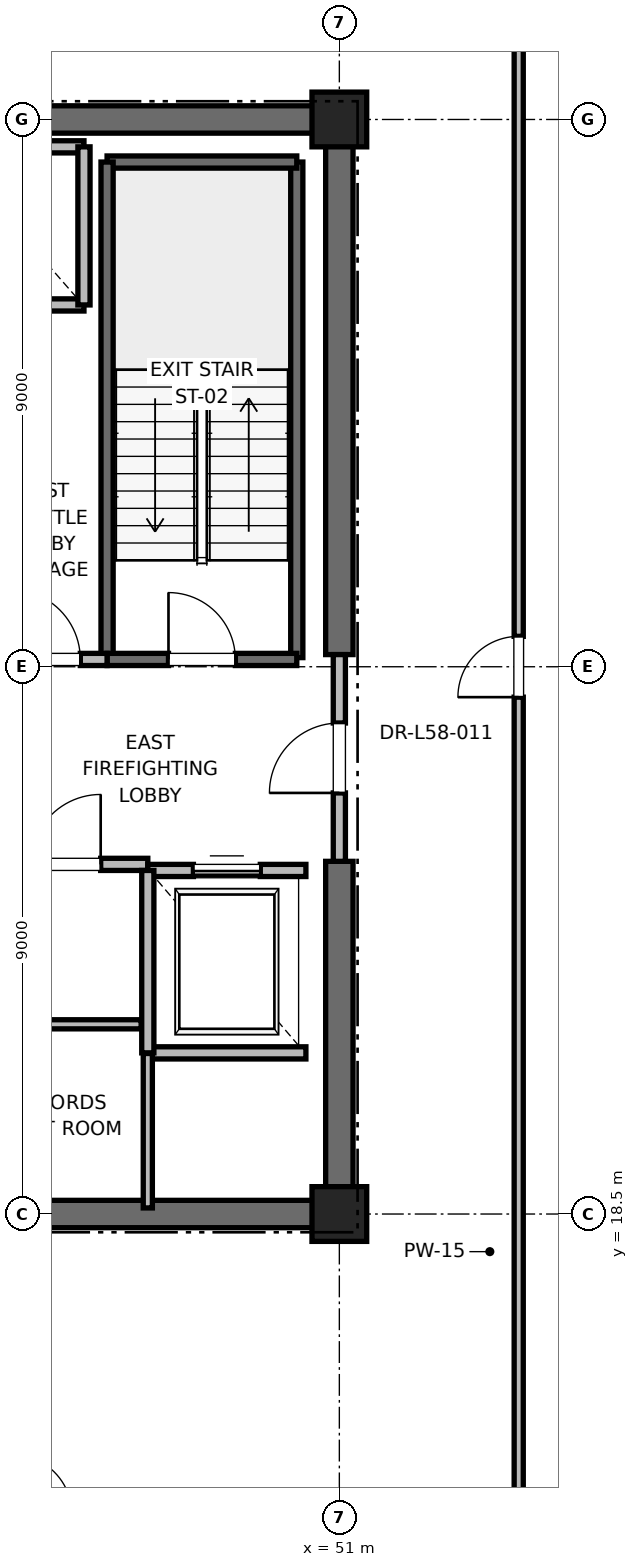
"""IFC4 building model, lengths in metres.
Left out: names, types, materials, properties, quantities, classifications, styles, units other than length and angle.
Written with IfcOpenShell. Run it as: python <this file> out.ifc"""

import sys

from ifc_helpers import new_model, si_unit, direction, frame, frame_2d, origin, origin_2d, place, context, subcontext, project, spatial, rectangle, extrude, element, fill, save


model = new_model("IFC4")
c1 = context("Model", 3, precision=1e-05, world=origin(), true_north=direction((0.0, 1.0)))
c2 = subcontext(c1, "Body", "Model", "MODEL_VIEW")
j1 = project(units=[si_unit("LENGTHUNIT", "METRE"), si_unit("PLANEANGLEUNIT", "RADIAN")], contexts=[c1])
p1 = place(None, origin())
s1 = spatial("IfcSite", under=j1, at=p1, CompositionType="ELEMENT")
p2 = place(p1, origin())
s2 = spatial("IfcBuilding", under=s1, at=p2, CompositionType="ELEMENT")
p3 = place(p2, frame((0.0, 0.0, 251.2)))
s3 = spatial("IfcBuildingStorey", under=s2, at=p3, CompositionType="ELEMENT", Elevation=251.2)
for number, where, z_axis, x_axis in (
    (1, (51.0, 18.5, 0.0), (0.0, 0.0, 1.0), (1.0, 0.0, 0.0)),
    (2, (51.0, 36.5, 0.0), (0.0, 0.0, 1.0), (1.0, 0.0, 0.0)),
):
    element("IfcColumn", number, at=place(p3, frame(where, z_axis=z_axis, x_axis=x_axis)), inside=s3, PredefinedType="PILASTER", context=c2, shape_type="SweptSolid", body=[
        extrude(rectangle(XDim=0.9, YDim=0.9, at=origin_2d()), origin(), (0.0, 0.0, 1.0), 4.0),
    ])
p4 = place(p3, frame((41.8, 18.5, 0.0), z_axis=(0.0, 0.0, 1.0), x_axis=(1.0, 0.0, 0.0)))
e3 = element("IfcWall", 3, at=p4, inside=s3, PredefinedType="SHEAR", context=c2, shape_type="SweptSolid", body=[
    extrude(rectangle(XDim=9.2, YDim=0.45, at=frame_2d((4.6, 0.0))), origin(), (0.0, 0.0, 1.0), 3.785),
])
for number, where, z_axis, x_axis in (
    (4, (45.2, 36.5, 0.0), (0.0, 0.0, 1.0), (1.0, 0.0, 0.0)),
    (5, (51.0, 18.5, 0.0), (0.0, 0.0, 1.0), (0.0, 1.0, 0.0)),
):
    element("IfcWall", number, at=place(p3, frame(where, z_axis=z_axis, x_axis=x_axis)), inside=s3, PredefinedType="SHEAR", context=c2, shape_type="SweptSolid", body=[
        extrude(rectangle(XDim=5.8, YDim=0.45, at=frame_2d((2.9, 0.0))), origin(), (0.0, 0.0, 1.0), 3.785),
    ])
p5 = place(p3, frame((51.0, 27.7, 0.0), z_axis=(0.0, 0.0, 1.0), x_axis=(0.0, 1.0, 0.0)))
e6 = element("IfcWall", 6, at=p5, inside=s3, PredefinedType="SHEAR", context=c2, shape_type="SweptSolid", body=[
    extrude(rectangle(XDim=8.8, YDim=0.45, at=frame_2d((4.4, 0.0))), origin(), (0.0, 0.0, 1.0), 3.785),
])
p6 = place(p3, frame((50.3, 27.65, 0.0), z_axis=(0.0, 0.0, 1.0), x_axis=(0.0, 1.0, 0.0)))
e7 = element("IfcWall", 7, at=p6, inside=s3, PredefinedType="SOLIDWALL", context=c2, shape_type="SweptSolid", body=[
    extrude(rectangle(XDim=8.15, YDim=0.2, at=frame_2d((4.075, 0.0))), origin(), (0.0, 0.0, 1.0), 3.785),
])
p7 = place(p3, frame((47.18, 35.8, 0.0), z_axis=(0.0, 0.0, 1.0), x_axis=(1.0, 0.0, 0.0)))
e8 = element("IfcWall", 8, at=p7, inside=s3, PredefinedType="SOLIDWALL", context=c2, shape_type="SweptSolid", body=[
    extrude(rectangle(XDim=3.12, YDim=0.2, at=frame_2d((1.56, 0.0))), origin(), (0.0, 0.0, 1.0), 3.785),
])
p8 = place(p3, frame((47.18, 27.62, 0.0), z_axis=(0.0, 0.0, 1.0), x_axis=(0.0, 1.0, 0.0)))
e9 = element("IfcWall", 9, at=p8, inside=s3, PredefinedType="SOLIDWALL", context=c2, shape_type="SweptSolid", body=[
    extrude(rectangle(XDim=8.18, YDim=0.2, at=frame_2d((4.09, 0.0))), origin(), (0.0, 0.0, 1.0), 3.785),
])
p9 = place(p3, frame((47.18, 27.62, 0.0), z_axis=(0.0, 0.0, 1.0), x_axis=(1.0, 0.0, 0.0)))
e10 = element("IfcWall", 10, at=p9, inside=s3, PredefinedType="SOLIDWALL", context=c2, shape_type="SweptSolid", body=[
    extrude(rectangle(XDim=3.12, YDim=0.2, at=frame_2d((1.56, 0.0))), origin(), (0.0, 0.0, 1.0), 3.785),
])
p10 = place(p9, frame((1.01, 0.0, 0.0)))
e11 = element("IfcOpeningElement", 11, at=p10, cuts=e10, PredefinedType="OPENING", context=c2, shape_type="SweptSolid", body=[
    extrude(rectangle(XDim=1.1, YDim=2.15, at=frame_2d((0.55, 1.075))), frame((0.0, 0.1, 0.0), z_axis=(0.0, -1.0, 0.0), x_axis=(1.0, 0.0, 0.0)), (0.0, 0.0, 1.0), 0.2),
])
p11 = place(p3, frame((45.15, 24.25, 0.0), z_axis=(0.0, 0.0, 1.0), x_axis=(1.0, 0.0, 0.0)))
e12 = element("IfcWall", 12, at=p11, inside=s3, PredefinedType="PARTITIONING", context=c2, shape_type="SweptSolid", body=[
    extrude(rectangle(XDim=2.7, YDim=0.2, at=frame_2d((1.35, 0.0))), origin(), (0.0, 0.0, 1.0), 3.785),
])
p12 = place(p11, frame((0.775, 0.0, 0.0)))
e13 = element("IfcOpeningElement", 13, at=p12, cuts=e12, PredefinedType="OPENING", context=c2, shape_type="SweptSolid", body=[
    extrude(rectangle(XDim=1.15, YDim=2.2, at=frame_2d((0.575, 1.1))), frame((0.0, 0.1, 0.0), z_axis=(0.0, -1.0, 0.0), x_axis=(1.0, 0.0, 0.0)), (0.0, 0.0, 1.0), 0.2),
])
p13 = place(p3, frame((45.15, 27.62, 0.0), z_axis=(0.0, 0.0, 1.0), x_axis=(1.0, 0.0, 0.0)))
e14 = element("IfcWall", 14, at=p13, inside=s3, PredefinedType="PARTITIONING", context=c2, shape_type="SweptSolid", body=[
    extrude(rectangle(XDim=2.03, YDim=0.2, at=frame_2d((1.015, 0.0))), origin(), (0.0, 0.0, 1.0), 3.785),
])
p14 = place(p13, frame((0.44, 0.0, 0.0)))
e15 = element("IfcOpeningElement", 15, at=p14, cuts=e14, PredefinedType="OPENING", context=c2, shape_type="SweptSolid", body=[
    extrude(rectangle(XDim=1.15, YDim=2.2, at=frame_2d((0.575, 1.1))), frame((0.0, 0.1, 0.0), z_axis=(0.0, -1.0, 0.0), x_axis=(1.0, 0.0, 0.0)), (0.0, 0.0, 1.0), 0.2),
])
p15 = place(p3, frame((51.0, 24.3, 0.0), z_axis=(0.0, 0.0, 1.0), x_axis=(0.0, 1.0, 0.0)))
e16 = element("IfcWall", 16, at=p15, inside=s3, PredefinedType="PARTITIONING", context=c2, shape_type="SweptSolid", body=[
    extrude(rectangle(XDim=3.4, YDim=0.2, at=frame_2d((1.7, 0.0))), origin(), (0.0, 0.0, 1.0), 2.865),
])
p16 = place(p15, frame((1.125, 0.0, 0.0)))
e17 = element("IfcOpeningElement", 17, at=p16, cuts=e16, PredefinedType="OPENING", context=c2, shape_type="SweptSolid", body=[
    extrude(rectangle(XDim=1.15, YDim=2.2, at=frame_2d((0.575, 1.1))), frame((0.0, 0.1, 0.0), z_axis=(0.0, -1.0, 0.0), x_axis=(1.0, 0.0, 0.0)), (0.0, 0.0, 1.0), 0.2),
])
p17 = place(p3, frame((47.85, 21.15, 0.0), z_axis=(0.0, 0.0, 1.0), x_axis=(1.0, 0.0, 0.0)))
e18 = element("IfcWall", 18, at=p17, inside=s3, PredefinedType="SOLIDWALL", context=c2, shape_type="SweptSolid", body=[
    extrude(rectangle(XDim=2.6, YDim=0.2, at=frame_2d((1.3, 0.0))), origin(), (0.0, 0.0, 1.0), 3.785),
])
p18 = place(p3, frame((50.45, 24.15, 0.0), z_axis=(0.0, 0.0, 1.0), x_axis=(-1.0, 0.0, 0.0)))
e19 = element("IfcWall", 19, at=p18, inside=s3, PredefinedType="SOLIDWALL", context=c2, shape_type="SweptSolid", body=[
    extrude(rectangle(XDim=2.6, YDim=0.2, at=frame_2d((1.3, 0.0))), origin(), (0.0, 0.0, 1.0), 2.865),
])
p19 = place(p18, frame((0.75, 0.0, 0.0)))
e20 = element("IfcOpeningElement", 20, at=p19, cuts=e19, PredefinedType="OPENING", context=c2, shape_type="SweptSolid", body=[
    extrude(rectangle(XDim=1.1, YDim=2.2, at=frame_2d((0.55, 1.1))), frame((0.0, 0.1, 0.0), z_axis=(0.0, -1.0, 0.0), x_axis=(1.0, 0.0, 0.0)), (0.0, 0.0, 1.0), 0.2),
])
p20 = place(p3, frame((47.85, 24.15, 0.0), z_axis=(0.0, 0.0, 1.0), x_axis=(0.0, -1.0, 0.0)))
e21 = element("IfcWall", 21, at=p20, inside=s3, PredefinedType="SOLIDWALL", context=c2, shape_type="SweptSolid", body=[
    extrude(rectangle(XDim=3.0, YDim=0.2, at=frame_2d((1.5, 0.0))), origin(), (0.0, 0.0, 1.0), 3.785),
])
p21 = place(p3, frame((44.5, 33.45, 0.0), z_axis=(0.0, 0.0, 1.0), x_axis=(1.0, 0.0, 0.0)))
e22 = element("IfcWall", 22, at=p21, inside=s3, PredefinedType="SOLIDWALL", context=c2, shape_type="SweptSolid", body=[
    extrude(rectangle(XDim=2.3, YDim=0.2, at=frame_2d((1.15, 0.0))), origin(), (0.0, 0.0, 1.0), 3.785),
])
p22 = place(p3, frame((46.8, 36.05, 0.0), z_axis=(0.0, 0.0, 1.0), x_axis=(-1.0, 0.0, 0.0)))
e23 = element("IfcWall", 23, at=p22, inside=s3, PredefinedType="SOLIDWALL", context=c2, shape_type="SweptSolid", body=[
    extrude(rectangle(XDim=2.3, YDim=0.2, at=frame_2d((1.15, 0.0))), origin(), (0.0, 0.0, 1.0), 2.865),
])
p23 = place(p3, frame((46.8, 33.45, 0.0), z_axis=(0.0, 0.0, 1.0), x_axis=(0.0, 1.0, 0.0)))
e24 = element("IfcWall", 24, at=p23, inside=s3, PredefinedType="SOLIDWALL", context=c2, shape_type="SweptSolid", body=[
    extrude(rectangle(XDim=2.6, YDim=0.2, at=frame_2d((1.3, 0.0))), origin(), (0.0, 0.0, 1.0), 3.785),
])
p24 = place(p3, frame((47.85, 18.6, 0.0), z_axis=(0.0, 0.0, 1.0), x_axis=(0.0, 1.0, 0.0)))
e25 = element("IfcWall", 25, at=p24, inside=s3, PredefinedType="PARTITIONING", context=c2, shape_type="SweptSolid", body=[
    extrude(rectangle(XDim=2.54, YDim=0.15, at=frame_2d((1.27, 0.0))), origin(), (0.0, 0.0, 1.0), 2.85),
])
p25 = place(p3, frame((41.76, 21.62, 0.0), z_axis=(0.0, 0.0, 1.0), x_axis=(1.0, 0.0, 0.0)))
e26 = element("IfcWall", 26, at=p25, inside=s3, PredefinedType="PARTITIONING", context=c2, shape_type="SweptSolid", body=[
    extrude(rectangle(XDim=5.98, YDim=0.15, at=frame_2d((2.99, 0.0))), origin(), (0.0, 0.0, 1.0), 2.85),
])
p26 = place(p25, frame((2.49, 0.0, 0.0)))
e27 = element("IfcOpeningElement", 27, at=p26, cuts=e26, PredefinedType="OPENING", context=c2, shape_type="SweptSolid", body=[
    extrude(rectangle(XDim=1.0, YDim=2.15, at=frame_2d((0.5, 1.075))), frame((0.0, 0.075, 0.0), z_axis=(0.0, -1.0, 0.0), x_axis=(1.0, 0.0, 0.0)), (0.0, 0.0, 1.0), 0.15),
])
p27 = place(p3, frame((53.95, 8.762, 0.0), z_axis=(0.0, 0.0, 1.0), x_axis=(0.0, 1.0, 0.0)))
e28 = element("IfcWall", 28, at=p27, inside=s3, PredefinedType="PARTITIONING", context=c2, shape_type="SweptSolid", body=[
    extrude(rectangle(XDim=37.475, YDim=0.15, at=frame_2d((18.738, 0.0))), origin(), (0.0, 0.0, 1.0), 2.85),
])
p28 = place(p27, frame((18.238, 0.0, 0.0)))
e29 = element("IfcOpeningElement", 29, at=p28, cuts=e28, PredefinedType="OPENING", context=c2, shape_type="SweptSolid", body=[
    extrude(rectangle(XDim=1.0, YDim=2.15, at=frame_2d((0.5, 1.075))), frame((0.0, 0.075, 0.0), z_axis=(0.0, -1.0, 0.0), x_axis=(1.0, 0.0, 0.0)), (0.0, 0.0, 1.0), 0.15),
])
p29 = place(p10, origin())
e30 = element("IfcDoor", 30, at=p29, inside=s3, OperationType="SINGLE_SWING_LEFT", PredefinedType="DOOR", context=c2, shape_type="SweptSolid", body=[
    extrude(rectangle(XDim=1.1, YDim=2.15, at=frame_2d((0.55, 1.075))), frame((0.0, 0.025, 0.0), z_axis=(0.0, -1.0, 0.0), x_axis=(1.0, 0.0, 0.0)), (0.0, 0.0, 1.0), 0.05),
])
fill(e11, e30)
p30 = place(p12, origin())
e31 = element("IfcDoor", 31, at=p30, inside=s3, OperationType="SINGLE_SWING_RIGHT", PredefinedType="DOOR", context=c2, shape_type="SweptSolid", body=[
    extrude(rectangle(XDim=1.15, YDim=2.2, at=frame_2d((0.575, 1.1))), frame((0.0, 0.025, 0.0), z_axis=(0.0, -1.0, 0.0), x_axis=(1.0, 0.0, 0.0)), (0.0, 0.0, 1.0), 0.05),
])
fill(e13, e31)
p31 = place(p14, origin())
e32 = element("IfcDoor", 32, at=p31, inside=s3, OperationType="SINGLE_SWING_LEFT", PredefinedType="DOOR", context=c2, shape_type="SweptSolid", body=[
    extrude(rectangle(XDim=1.15, YDim=2.2, at=frame_2d((0.575, 1.1))), frame((0.0, 0.025, 0.0), z_axis=(0.0, -1.0, 0.0), x_axis=(1.0, 0.0, 0.0)), (0.0, 0.0, 1.0), 0.05),
])
fill(e15, e32)
p32 = place(p16, origin())
e33 = element("IfcDoor", 33, at=p32, inside=s3, OperationType="SINGLE_SWING_LEFT", PredefinedType="DOOR", context=c2, shape_type="SweptSolid", body=[
    extrude(rectangle(XDim=1.15, YDim=2.2, at=frame_2d((0.575, 1.1))), frame((0.0, 0.025, 0.0), z_axis=(0.0, -1.0, 0.0), x_axis=(1.0, 0.0, 0.0)), (0.0, 0.0, 1.0), 0.05),
])
fill(e17, e33)
p33 = place(p19, origin())
e34 = element("IfcDoor", 34, at=p33, inside=s3, OperationType="SLIDING_TO_RIGHT", PredefinedType="DOOR", context=c2, shape_type="SweptSolid", body=[
    extrude(rectangle(XDim=1.1, YDim=2.2, at=frame_2d((0.55, 1.1))), frame((0.0, 0.025, 0.0), z_axis=(0.0, -1.0, 0.0), x_axis=(1.0, 0.0, 0.0)), (0.0, 0.0, 1.0), 0.05),
])
fill(e20, e34)
p34 = place(p28, origin())
e35 = element("IfcDoor", 35, at=p34, inside=s3, OperationType="SINGLE_SWING_LEFT", PredefinedType="DOOR", context=c2, shape_type="SweptSolid", body=[
    extrude(rectangle(XDim=1.0, YDim=2.15, at=frame_2d((0.5, 1.075))), frame((0.0, 0.025, 0.0), z_axis=(0.0, -1.0, 0.0), x_axis=(1.0, 0.0, 0.0)), (0.0, 0.0, 1.0), 0.05),
])
fill(e29, e35)
save(model, sys.argv[1])
